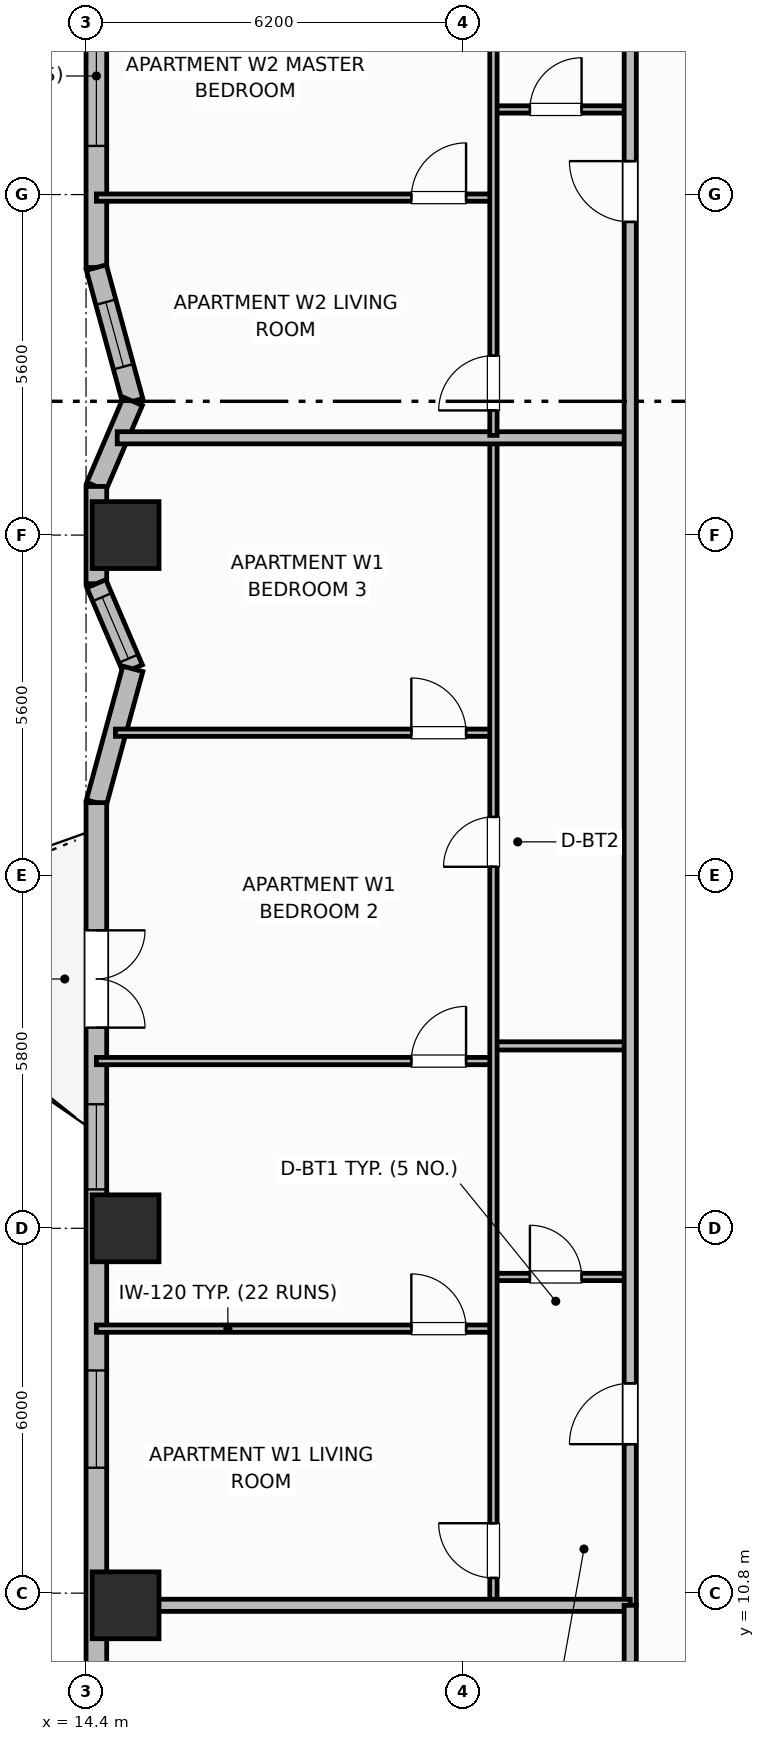
"""IFC4 building model, lengths in metres.
Left out: names, types, materials, properties, quantities, classifications, styles, units other than length and angle.
Written with IfcOpenShell. Run it as: python <this file> out.ifc"""

import sys

from ifc_helpers import new_model, si_unit, direction, frame, frame_2d, origin, origin_2d, place, context, subcontext, project, spatial, rectangle, extrude, element, fill, save


model = new_model("IFC4")
c1 = context("Model", 3, precision=1e-05, world=origin(), true_north=direction((0.0, 1.0)))
c2 = subcontext(c1, "Body", "Model", "MODEL_VIEW")
j1 = project(units=[si_unit("LENGTHUNIT", "METRE"), si_unit("PLANEANGLEUNIT", "RADIAN")], contexts=[c1])
p1 = place(None, origin())
s1 = spatial("IfcSite", under=j1, at=p1, CompositionType="ELEMENT")
p2 = place(p1, origin())
s2 = spatial("IfcBuilding", under=s1, at=p2, CompositionType="ELEMENT")
p3 = place(p2, frame((0.0, 0.0, 88.3)))
s3 = spatial("IfcBuildingStorey", under=s2, at=p3, CompositionType="ELEMENT", Elevation=88.3)
for number, where, z_axis, x_axis in (
    (1, (15.05, 10.6, 0.0), (0.0, 0.0, 1.0), (1.0, 0.0, 0.0)),
    (2, (15.05, 16.8, 0.0), (0.0, 0.0, 1.0), (1.0, 0.0, 0.0)),
    (3, (15.05, 28.2, 0.0), (0.0, 0.0, 1.0), (1.0, 0.0, 0.0)),
):
    element("IfcColumn", number, at=place(p3, frame(where, z_axis=z_axis, x_axis=x_axis)), inside=s3, PredefinedType="COLUMN", context=c2, shape_type="SweptSolid", body=[
        extrude(rectangle(XDim=1.1, YDim=1.1, at=origin_2d()), origin(), (0.0, 0.0, 1.0), 3.7),
    ])
p4 = place(p3, frame((14.57, 47.4, 0.0), z_axis=(0.0, 0.0, 1.0), x_axis=(0.0, -1.0, 0.0)))
e4 = element("IfcWall", 4, at=p4, inside=s3, PredefinedType="SOLIDWALL", context=c2, shape_type="SweptSolid", body=[
    extrude(rectangle(XDim=14.8, YDim=0.34, at=frame_2d((7.4, 0.0))), origin(), (0.0, 0.0, 1.0), 2.7),
])
p5 = place(p4, frame((3.05, 0.0, 0.73)))
e5 = element("IfcOpeningElement", 5, at=p5, cuts=e4, PredefinedType="OPENING", context=c2, shape_type="SweptSolid", body=[
    extrude(rectangle(XDim=1.8, YDim=1.85, at=frame_2d((0.9, 0.925))), frame((0.0, 0.18, 0.0), z_axis=(0.0, -1.0, 0.0), x_axis=(1.0, 0.0, 0.0)), (0.0, 0.0, 1.0), 0.36),
])
p6 = place(p4, frame((6.08, 0.0, 0.89)))
e6 = element("IfcOpeningElement", 6, at=p6, cuts=e4, PredefinedType="OPENING", context=c2, shape_type="SweptSolid", body=[
    extrude(rectangle(XDim=1.1, YDim=1.65, at=frame_2d((0.55, 0.825))), frame((0.0, 0.18, 0.0), z_axis=(0.0, -1.0, 0.0), x_axis=(1.0, 0.0, 0.0)), (0.0, 0.0, 1.0), 0.36),
])
p7 = place(p4, frame((11.0, 0.0, 0.73)))
e7 = element("IfcOpeningElement", 7, at=p7, cuts=e4, PredefinedType="OPENING", context=c2, shape_type="SweptSolid", body=[
    extrude(rectangle(XDim=1.8, YDim=1.85, at=frame_2d((0.9, 0.925))), frame((0.0, 0.18, 0.0), z_axis=(0.0, -1.0, 0.0), x_axis=(1.0, 0.0, 0.0)), (0.0, 0.0, 1.0), 0.36),
])
p8 = place(p3, frame((14.57, 32.6, 0.0), z_axis=(0.0, 0.0, 1.0), x_axis=(0.263035877812, -0.96478605244, 0.0)))
e8 = element("IfcWall", 8, at=p8, inside=s3, PredefinedType="SOLIDWALL", context=c2, shape_type="SweptSolid", body=[
    extrude(rectangle(XDim=2.281, YDim=0.34, at=frame_2d((1.14, 0.0))), origin(), (0.0, 0.0, 1.0), 2.7),
])
p9 = place(p8, frame((0.59, 0.0, 0.89)))
e9 = element("IfcOpeningElement", 9, at=p9, cuts=e8, PredefinedType="OPENING", context=c2, shape_type="SweptSolid", body=[
    extrude(rectangle(XDim=1.1, YDim=1.65, at=frame_2d((0.55, 0.825))), frame((0.0, 0.18, 0.0), z_axis=(0.0, -1.0, 0.0), x_axis=(1.0, 0.0, 0.0)), (0.0, 0.0, 1.0), 0.36),
])
p10 = place(p3, frame((15.17, 30.4, 0.0), z_axis=(0.0, 0.0, 1.0), x_axis=(-0.393861257526, -0.919169902586, 0.0)))
e10 = element("IfcWall", 10, at=p10, inside=s3, PredefinedType="SOLIDWALL", context=c2, shape_type="SweptSolid", body=[
    extrude(rectangle(XDim=1.523, YDim=0.34, at=frame_2d((0.761, 0.0))), origin(), (0.0, 0.0, 1.0), 2.7),
])
p11 = place(p3, frame((14.57, 29.0, 0.0), z_axis=(0.0, 0.0, 1.0), x_axis=(0.0, -1.0, 0.0)))
e11 = element("IfcWall", 11, at=p11, inside=s3, PredefinedType="SOLIDWALL", context=c2, shape_type="SweptSolid", body=[
    extrude(rectangle(XDim=1.6, YDim=0.34, at=frame_2d((0.8, 0.0))), origin(), (0.0, 0.0, 1.0), 2.7),
])
p12 = place(p3, frame((14.57, 27.4, 0.0), z_axis=(0.0, 0.0, 1.0), x_axis=(0.393861257526, -0.919169902586, 0.0)))
e12 = element("IfcWall", 12, at=p12, inside=s3, PredefinedType="SOLIDWALL", context=c2, shape_type="SweptSolid", body=[
    extrude(rectangle(XDim=1.523, YDim=0.34, at=frame_2d((0.761, 0.0))), origin(), (0.0, 0.0, 1.0), 2.7),
])
p13 = place(p12, frame((0.24, 0.0, 0.89)))
e13 = element("IfcOpeningElement", 13, at=p13, cuts=e12, PredefinedType="OPENING", context=c2, shape_type="SweptSolid", body=[
    extrude(rectangle(XDim=1.1, YDim=1.65, at=frame_2d((0.55, 0.825))), frame((0.0, 0.18, 0.0), z_axis=(0.0, -1.0, 0.0), x_axis=(1.0, 0.0, 0.0)), (0.0, 0.0, 1.0), 0.36),
])
p14 = place(p3, frame((15.17, 26.0, 0.0), z_axis=(0.0, 0.0, 1.0), x_axis=(-0.2630630484, -0.964778644336, 0.0)))
e14 = element("IfcWall", 14, at=p14, inside=s3, PredefinedType="SOLIDWALL", context=c2, shape_type="SweptSolid", body=[
    extrude(rectangle(XDim=2.28, YDim=0.34, at=frame_2d((1.14, 0.0))), origin(), (0.0, 0.0, 1.0), 2.7),
])
p15 = place(p3, frame((14.57, 23.8, 0.0), z_axis=(0.0, 0.0, 1.0), x_axis=(0.0, -1.0, 0.0)))
e15 = element("IfcWall", 15, at=p15, inside=s3, PredefinedType="SOLIDWALL", context=c2, shape_type="SweptSolid", body=[
    extrude(rectangle(XDim=14.8, YDim=0.34, at=frame_2d((7.4, 0.0))), origin(), (0.0, 0.0, 1.0), 2.7),
])
p16 = place(p15, frame((2.1, 0.0, 0.0)))
e16 = element("IfcOpeningElement", 16, at=p16, cuts=e15, PredefinedType="OPENING", context=c2, shape_type="SweptSolid", body=[
    extrude(rectangle(XDim=1.6, YDim=2.1, at=frame_2d((0.8, 1.05))), frame((0.0, 0.18, 0.0), z_axis=(0.0, -1.0, 0.0), x_axis=(1.0, 0.0, 0.0)), (0.0, 0.0, 1.0), 0.36),
])
p17 = place(p15, frame((4.96, 0.0, 0.69)))
e17 = element("IfcOpeningElement", 17, at=p17, cuts=e15, PredefinedType="OPENING", context=c2, shape_type="SweptSolid", body=[
    extrude(rectangle(XDim=1.4, YDim=1.85, at=frame_2d((0.7, 0.925))), frame((0.0, 0.18, 0.0), z_axis=(0.0, -1.0, 0.0), x_axis=(1.0, 0.0, 0.0)), (0.0, 0.0, 1.0), 0.36),
])
p18 = place(p15, frame((9.337, 0.0, 0.68)))
e18 = element("IfcOpeningElement", 18, at=p18, cuts=e15, PredefinedType="OPENING", context=c2, shape_type="SweptSolid", body=[
    extrude(rectangle(XDim=1.6, YDim=1.9, at=frame_2d((0.8, 0.95))), frame((0.0, 0.18, 0.0), z_axis=(0.0, -1.0, 0.0), x_axis=(1.0, 0.0, 0.0)), (0.0, 0.0, 1.0), 0.36),
])
p19 = place(p3, frame((21.1, 16.0, 0.0), z_axis=(0.0, 0.0, 1.0), x_axis=(1.0, 0.0, 0.0)))
e19 = element("IfcWall", 19, at=p19, inside=s3, PredefinedType="PARTITIONING", context=c2, shape_type="SweptSolid", body=[
    extrude(rectangle(XDim=2.25, YDim=0.12, at=frame_2d((1.125, 0.0))), origin(), (0.0, 0.0, 1.0), 2.53),
])
p20 = place(p19, frame((0.6, 0.0, 0.0)))
e20 = element("IfcOpeningElement", 20, at=p20, cuts=e19, PredefinedType="OPENING", context=c2, shape_type="SweptSolid", body=[
    extrude(rectangle(XDim=0.85, YDim=2.1, at=frame_2d((0.425, 1.05))), frame((0.0, 0.07, 0.0), z_axis=(0.0, -1.0, 0.0), x_axis=(1.0, 0.0, 0.0)), (0.0, 0.0, 1.0), 0.14),
])
p21 = place(p3, frame((21.1, 19.8, 0.0), z_axis=(0.0, 0.0, 1.0), x_axis=(1.0, 0.0, 0.0)))
e21 = element("IfcWall", 21, at=p21, inside=s3, PredefinedType="PARTITIONING", context=c2, shape_type="SweptSolid", body=[
    extrude(rectangle(XDim=2.25, YDim=0.135, at=frame_2d((1.125, 0.0))), origin(), (0.0, 0.0, 1.0), 2.53),
])
p22 = place(p3, frame((14.57, 15.15, 0.0), z_axis=(0.0, 0.0, 1.0), x_axis=(1.0, 0.0, 0.0)))
e22 = element("IfcWall", 22, at=p22, inside=s3, PredefinedType="PARTITIONING", context=c2, shape_type="SweptSolid", body=[
    extrude(rectangle(XDim=6.53, YDim=0.12, at=frame_2d((3.265, 0.0))), origin(), (0.0, 0.0, 1.0), 2.53),
])
p23 = place(p22, frame((5.18, 0.0, 0.0)))
e23 = element("IfcOpeningElement", 23, at=p23, cuts=e22, PredefinedType="OPENING", context=c2, shape_type="SweptSolid", body=[
    extrude(rectangle(XDim=0.9, YDim=2.1, at=frame_2d((0.45, 1.05))), frame((0.0, 0.07, 0.0), z_axis=(0.0, -1.0, 0.0), x_axis=(1.0, 0.0, 0.0)), (0.0, 0.0, 1.0), 0.14),
])
p24 = place(p3, frame((14.57, 19.55, 0.0), z_axis=(0.0, 0.0, 1.0), x_axis=(1.0, 0.0, 0.0)))
e24 = element("IfcWall", 24, at=p24, inside=s3, PredefinedType="PARTITIONING", context=c2, shape_type="SweptSolid", body=[
    extrude(rectangle(XDim=6.53, YDim=0.12, at=frame_2d((3.265, 0.0))), origin(), (0.0, 0.0, 1.0), 2.53),
])
p25 = place(p24, frame((5.18, 0.0, 0.0)))
e25 = element("IfcOpeningElement", 25, at=p25, cuts=e24, PredefinedType="OPENING", context=c2, shape_type="SweptSolid", body=[
    extrude(rectangle(XDim=0.9, YDim=2.1, at=frame_2d((0.45, 1.05))), frame((0.0, 0.07, 0.0), z_axis=(0.0, -1.0, 0.0), x_axis=(1.0, 0.0, 0.0)), (0.0, 0.0, 1.0), 0.14),
])
p26 = place(p3, frame((14.884, 24.95, 0.0), z_axis=(0.0, 0.0, 1.0), x_axis=(1.0, 0.0, 0.0)))
e26 = element("IfcWall", 26, at=p26, inside=s3, PredefinedType="PARTITIONING", context=c2, shape_type="SweptSolid", body=[
    extrude(rectangle(XDim=6.217, YDim=0.12, at=frame_2d((3.108, 0.0))), origin(), (0.0, 0.0, 1.0), 2.53),
])
p27 = place(p26, frame((4.866, 0.0, 0.0)))
e27 = element("IfcOpeningElement", 27, at=p27, cuts=e26, PredefinedType="OPENING", context=c2, shape_type="SweptSolid", body=[
    extrude(rectangle(XDim=0.9, YDim=2.1, at=frame_2d((0.45, 1.05))), frame((0.0, 0.07, 0.0), z_axis=(0.0, -1.0, 0.0), x_axis=(1.0, 0.0, 0.0)), (0.0, 0.0, 1.0), 0.14),
])
p28 = place(p3, frame((21.1, 10.64, 0.0), z_axis=(0.0, 0.0, 1.0), x_axis=(0.0, 1.0, 0.0)))
e28 = element("IfcWall", 28, at=p28, inside=s3, PredefinedType="PARTITIONING", context=c2, shape_type="SweptSolid", body=[
    extrude(rectangle(XDim=19.12, YDim=0.12, at=frame_2d((9.56, 0.0))), origin(), (0.0, 0.0, 1.0), 2.53),
])
p29 = place(p28, frame((0.41, 0.0, 0.0)))
e29 = element("IfcOpeningElement", 29, at=p29, cuts=e28, PredefinedType="OPENING", context=c2, shape_type="SweptSolid", body=[
    extrude(rectangle(XDim=0.9, YDim=2.1, at=frame_2d((0.45, 1.05))), frame((0.0, 0.07, 0.0), z_axis=(0.0, -1.0, 0.0), x_axis=(1.0, 0.0, 0.0)), (0.0, 0.0, 1.0), 0.14),
])
p30 = place(p28, frame((12.105, 0.0, 0.0)))
e30 = element("IfcOpeningElement", 30, at=p30, cuts=e28, PredefinedType="OPENING", context=c2, shape_type="SweptSolid", body=[
    extrude(rectangle(XDim=0.82, YDim=2.08, at=frame_2d((0.41, 1.04))), frame((0.0, 0.07, 0.0), z_axis=(0.0, -1.0, 0.0), x_axis=(1.0, 0.0, 0.0)), (0.0, 0.0, 1.0), 0.14),
])
p31 = place(p3, frame((14.913, 29.8, 0.0), z_axis=(0.0, 0.0, 1.0), x_axis=(1.0, 0.0, 0.0)))
e31 = element("IfcWall", 31, at=p31, inside=s3, PredefinedType="PARTITIONING", context=c2, shape_type="SweptSolid", body=[
    extrude(rectangle(XDim=8.437, YDim=0.2, at=frame_2d((4.219, 0.0))), origin(), (0.0, 0.0, 1.0), 2.53),
])
p32 = place(p3, frame((21.1, 35.2, 0.0), z_axis=(0.0, 0.0, 1.0), x_axis=(1.0, 0.0, 0.0)))
e32 = element("IfcWall", 32, at=p32, inside=s3, PredefinedType="PARTITIONING", context=c2, shape_type="SweptSolid", body=[
    extrude(rectangle(XDim=2.25, YDim=0.12, at=frame_2d((1.125, 0.0))), origin(), (0.0, 0.0, 1.0), 2.53),
])
p33 = place(p32, frame((0.6, 0.0, 0.0)))
e33 = element("IfcOpeningElement", 33, at=p33, cuts=e32, PredefinedType="OPENING", context=c2, shape_type="SweptSolid", body=[
    extrude(rectangle(XDim=0.85, YDim=2.1, at=frame_2d((0.425, 1.05))), frame((0.0, 0.07, 0.0), z_axis=(0.0, -1.0, 0.0), x_axis=(1.0, 0.0, 0.0)), (0.0, 0.0, 1.0), 0.14),
])
p34 = place(p3, frame((14.57, 33.75, 0.0), z_axis=(0.0, 0.0, 1.0), x_axis=(1.0, 0.0, 0.0)))
e34 = element("IfcWall", 34, at=p34, inside=s3, PredefinedType="PARTITIONING", context=c2, shape_type="SweptSolid", body=[
    extrude(rectangle(XDim=6.53, YDim=0.12, at=frame_2d((3.265, 0.0))), origin(), (0.0, 0.0, 1.0), 2.53),
])
p35 = place(p34, frame((5.18, 0.0, 0.0)))
e35 = element("IfcOpeningElement", 35, at=p35, cuts=e34, PredefinedType="OPENING", context=c2, shape_type="SweptSolid", body=[
    extrude(rectangle(XDim=0.9, YDim=2.1, at=frame_2d((0.45, 1.05))), frame((0.0, 0.07, 0.0), z_axis=(0.0, -1.0, 0.0), x_axis=(1.0, 0.0, 0.0)), (0.0, 0.0, 1.0), 0.14),
])
p36 = place(p3, frame((21.1, 29.84, 0.0), z_axis=(0.0, 0.0, 1.0), x_axis=(0.0, 1.0, 0.0)))
e36 = element("IfcWall", 36, at=p36, inside=s3, PredefinedType="PARTITIONING", context=c2, shape_type="SweptSolid", body=[
    extrude(rectangle(XDim=15.92, YDim=0.12, at=frame_2d((7.96, 0.0))), origin(), (0.0, 0.0, 1.0), 2.53),
])
p37 = place(p36, frame((0.41, 0.0, 0.0)))
e37 = element("IfcOpeningElement", 37, at=p37, cuts=e36, PredefinedType="OPENING", context=c2, shape_type="SweptSolid", body=[
    extrude(rectangle(XDim=0.9, YDim=2.1, at=frame_2d((0.45, 1.05))), frame((0.0, 0.07, 0.0), z_axis=(0.0, -1.0, 0.0), x_axis=(1.0, 0.0, 0.0)), (0.0, 0.0, 1.0), 0.14),
])
p38 = place(p36, frame((13.125, 0.0, 0.0)))
e38 = element("IfcOpeningElement", 38, at=p38, cuts=e36, PredefinedType="OPENING", context=c2, shape_type="SweptSolid", body=[
    extrude(rectangle(XDim=0.82, YDim=2.08, at=frame_2d((0.41, 1.04))), frame((0.0, 0.07, 0.0), z_axis=(0.0, -1.0, 0.0), x_axis=(1.0, 0.0, 0.0)), (0.0, 0.0, 1.0), 0.14),
])
p39 = place(p3, frame((23.35, 10.6, 0.0), z_axis=(0.0, 0.0, 1.0), x_axis=(0.0, 1.0, 0.0)))
e39 = element("IfcWall", 39, at=p39, inside=s3, PredefinedType="PARTITIONING", context=c2, shape_type="SweptSolid", body=[
    extrude(rectangle(XDim=35.2, YDim=0.2, at=frame_2d((17.6, 0.0))), origin(), (0.0, 0.0, 1.0), 2.53),
])
p40 = place(p39, frame((2.65, 0.0, 0.0)))
e40 = element("IfcOpeningElement", 40, at=p40, cuts=e39, PredefinedType="OPENING", context=c2, shape_type="SweptSolid", body=[
    extrude(rectangle(XDim=1.0, YDim=2.15, at=frame_2d((0.5, 1.075))), frame((0.0, 0.11, 0.0), z_axis=(0.0, -1.0, 0.0), x_axis=(1.0, 0.0, 0.0)), (0.0, 0.0, 1.0), 0.22),
])
p41 = place(p39, frame((22.75, 0.0, 0.0)))
e41 = element("IfcOpeningElement", 41, at=p41, cuts=e39, PredefinedType="OPENING", context=c2, shape_type="SweptSolid", body=[
    extrude(rectangle(XDim=1.0, YDim=2.15, at=frame_2d((0.5, 1.075))), frame((0.0, 0.11, 0.0), z_axis=(0.0, -1.0, 0.0), x_axis=(1.0, 0.0, 0.0)), (0.0, 0.0, 1.0), 0.22),
])
p42 = place(p3, frame((14.99, 10.6, 0.0), z_axis=(0.0, 0.0, 1.0), x_axis=(1.0, 0.0, 0.0)))
e42 = element("IfcWall", 42, at=p42, inside=s3, PredefinedType="PARTITIONING", context=c2, shape_type="SweptSolid", body=[
    extrude(rectangle(XDim=8.36, YDim=0.2, at=frame_2d((4.18, 0.0))), origin(), (0.0, 0.0, 1.0), 2.53),
])
p43 = place(p3, frame((23.35, 4.97, 0.0), z_axis=(0.0, 0.0, 1.0), x_axis=(0.0, 1.0, 0.0)))
e43 = element("IfcWall", 43, at=p43, inside=s3, PredefinedType="PARTITIONING", context=c2, shape_type="SweptSolid", body=[
    extrude(rectangle(XDim=5.63, YDim=0.2, at=frame_2d((2.815, 0.0))), origin(), (0.0, 0.0, 1.0), 2.53),
])
p44 = place(p7, origin())
e44 = element("IfcWindow", 44, at=p44, inside=s3, PartitioningType="SINGLE_PANEL", PredefinedType="WINDOW", context=c2, shape_type="SweptSolid", body=[
    extrude(rectangle(XDim=1.8, YDim=1.85, at=frame_2d((0.9, 0.925))), frame((0.0, 0.03, 0.0), z_axis=(0.0, -1.0, 0.0), x_axis=(1.0, 0.0, 0.0)), (0.0, 0.0, 1.0), 0.06),
])
fill(e7, e44)
p45 = place(p9, origin())
e45 = element("IfcWindow", 45, at=p45, inside=s3, PartitioningType="SINGLE_PANEL", PredefinedType="WINDOW", context=c2, shape_type="SweptSolid", body=[
    extrude(rectangle(XDim=1.1, YDim=1.65, at=frame_2d((0.55, 0.825))), frame((0.0, 0.03, 0.0), z_axis=(0.0, -1.0, 0.0), x_axis=(1.0, 0.0, 0.0)), (0.0, 0.0, 1.0), 0.06),
])
fill(e9, e45)
p46 = place(p13, origin())
e46 = element("IfcWindow", 46, at=p46, inside=s3, PartitioningType="SINGLE_PANEL", PredefinedType="WINDOW", context=c2, shape_type="SweptSolid", body=[
    extrude(rectangle(XDim=1.1, YDim=1.65, at=frame_2d((0.55, 0.825))), frame((0.0, 0.03, 0.0), z_axis=(0.0, -1.0, 0.0), x_axis=(1.0, 0.0, 0.0)), (0.0, 0.0, 1.0), 0.06),
])
fill(e13, e46)
p47 = place(p16, origin())
e47 = element("IfcDoor", 47, at=p47, inside=s3, OperationType="DOUBLE_DOOR_SINGLE_SWING", PredefinedType="DOOR", context=c2, shape_type="SweptSolid", body=[
    extrude(rectangle(XDim=1.6, YDim=2.1, at=frame_2d((0.8, 1.05))), frame((0.0, 0.025, 0.0), z_axis=(0.0, -1.0, 0.0), x_axis=(1.0, 0.0, 0.0)), (0.0, 0.0, 1.0), 0.05),
])
fill(e16, e47)
p48 = place(p17, origin())
e48 = element("IfcWindow", 48, at=p48, inside=s3, PartitioningType="SINGLE_PANEL", PredefinedType="WINDOW", context=c2, shape_type="SweptSolid", body=[
    extrude(rectangle(XDim=1.4, YDim=1.85, at=frame_2d((0.7, 0.925))), frame((0.0, 0.03, 0.0), z_axis=(0.0, -1.0, 0.0), x_axis=(1.0, 0.0, 0.0)), (0.0, 0.0, 1.0), 0.06),
])
fill(e17, e48)
p49 = place(p18, origin())
e49 = element("IfcWindow", 49, at=p49, inside=s3, PartitioningType="SINGLE_PANEL", PredefinedType="WINDOW", context=c2, shape_type="SweptSolid", body=[
    extrude(rectangle(XDim=1.6, YDim=1.9, at=frame_2d((0.8, 0.95))), frame((0.0, 0.03, 0.0), z_axis=(0.0, -1.0, 0.0), x_axis=(1.0, 0.0, 0.0)), (0.0, 0.0, 1.0), 0.06),
])
fill(e18, e49)
p50 = place(p20, origin())
e50 = element("IfcDoor", 50, at=p50, inside=s3, OperationType="SINGLE_SWING_LEFT", PredefinedType="DOOR", context=c2, shape_type="SweptSolid", body=[
    extrude(rectangle(XDim=0.85, YDim=2.1, at=frame_2d((0.425, 1.05))), frame((0.0, 0.025, 0.0), z_axis=(0.0, -1.0, 0.0), x_axis=(1.0, 0.0, 0.0)), (0.0, 0.0, 1.0), 0.05),
])
fill(e20, e50)
p51 = place(p23, origin())
e51 = element("IfcDoor", 51, at=p51, inside=s3, OperationType="SINGLE_SWING_LEFT", PredefinedType="DOOR", context=c2, shape_type="SweptSolid", body=[
    extrude(rectangle(XDim=0.9, YDim=2.1, at=frame_2d((0.45, 1.05))), frame((0.0, 0.025, 0.0), z_axis=(0.0, -1.0, 0.0), x_axis=(1.0, 0.0, 0.0)), (0.0, 0.0, 1.0), 0.05),
])
fill(e23, e51)
p52 = place(p25, origin())
e52 = element("IfcDoor", 52, at=p52, inside=s3, OperationType="SINGLE_SWING_RIGHT", PredefinedType="DOOR", context=c2, shape_type="SweptSolid", body=[
    extrude(rectangle(XDim=0.9, YDim=2.1, at=frame_2d((0.45, 1.05))), frame((0.0, 0.025, 0.0), z_axis=(0.0, -1.0, 0.0), x_axis=(1.0, 0.0, 0.0)), (0.0, 0.0, 1.0), 0.05),
])
fill(e25, e52)
p53 = place(p27, origin())
e53 = element("IfcDoor", 53, at=p53, inside=s3, OperationType="SINGLE_SWING_LEFT", PredefinedType="DOOR", context=c2, shape_type="SweptSolid", body=[
    extrude(rectangle(XDim=0.9, YDim=2.1, at=frame_2d((0.45, 1.05))), frame((0.0, 0.025, 0.0), z_axis=(0.0, -1.0, 0.0), x_axis=(1.0, 0.0, 0.0)), (0.0, 0.0, 1.0), 0.05),
])
fill(e27, e53)
p54 = place(p29, origin())
e54 = element("IfcDoor", 54, at=p54, inside=s3, OperationType="SINGLE_SWING_RIGHT", PredefinedType="DOOR", context=c2, shape_type="SweptSolid", body=[
    extrude(rectangle(XDim=0.9, YDim=2.1, at=frame_2d((0.45, 1.05))), frame((0.0, 0.025, 0.0), z_axis=(0.0, -1.0, 0.0), x_axis=(1.0, 0.0, 0.0)), (0.0, 0.0, 1.0), 0.05),
])
fill(e29, e54)
p55 = place(p30, origin())
e55 = element("IfcDoor", 55, at=p55, inside=s3, OperationType="SINGLE_SWING_LEFT", PredefinedType="DOOR", context=c2, shape_type="SweptSolid", body=[
    extrude(rectangle(XDim=0.82, YDim=2.08, at=frame_2d((0.41, 1.04))), frame((0.0, 0.025, 0.0), z_axis=(0.0, -1.0, 0.0), x_axis=(1.0, 0.0, 0.0)), (0.0, 0.0, 1.0), 0.05),
])
fill(e30, e55)
p56 = place(p33, origin())
e56 = element("IfcDoor", 56, at=p56, inside=s3, OperationType="SINGLE_SWING_RIGHT", PredefinedType="DOOR", context=c2, shape_type="SweptSolid", body=[
    extrude(rectangle(XDim=0.85, YDim=2.1, at=frame_2d((0.425, 1.05))), frame((0.0, 0.025, 0.0), z_axis=(0.0, -1.0, 0.0), x_axis=(1.0, 0.0, 0.0)), (0.0, 0.0, 1.0), 0.05),
])
fill(e33, e56)
p57 = place(p35, origin())
e57 = element("IfcDoor", 57, at=p57, inside=s3, OperationType="SINGLE_SWING_RIGHT", PredefinedType="DOOR", context=c2, shape_type="SweptSolid", body=[
    extrude(rectangle(XDim=0.9, YDim=2.1, at=frame_2d((0.45, 1.05))), frame((0.0, 0.025, 0.0), z_axis=(0.0, -1.0, 0.0), x_axis=(1.0, 0.0, 0.0)), (0.0, 0.0, 1.0), 0.05),
])
fill(e35, e57)
p58 = place(p37, origin())
e58 = element("IfcDoor", 58, at=p58, inside=s3, OperationType="SINGLE_SWING_LEFT", PredefinedType="DOOR", context=c2, shape_type="SweptSolid", body=[
    extrude(rectangle(XDim=0.9, YDim=2.1, at=frame_2d((0.45, 1.05))), frame((0.0, 0.025, 0.0), z_axis=(0.0, -1.0, 0.0), x_axis=(1.0, 0.0, 0.0)), (0.0, 0.0, 1.0), 0.05),
])
fill(e37, e58)
p59 = place(p40, origin())
e59 = element("IfcDoor", 59, at=p59, inside=s3, OperationType="SINGLE_SWING_LEFT", PredefinedType="DOOR", context=c2, shape_type="SweptSolid", body=[
    extrude(rectangle(XDim=1.0, YDim=2.15, at=frame_2d((0.5, 1.075))), frame((0.0, 0.025, 0.0), z_axis=(0.0, -1.0, 0.0), x_axis=(1.0, 0.0, 0.0)), (0.0, 0.0, 1.0), 0.05),
])
fill(e40, e59)
p60 = place(p41, origin())
e60 = element("IfcDoor", 60, at=p60, inside=s3, OperationType="SINGLE_SWING_RIGHT", PredefinedType="DOOR", context=c2, shape_type="SweptSolid", body=[
    extrude(rectangle(XDim=1.0, YDim=2.15, at=frame_2d((0.5, 1.075))), frame((0.0, 0.025, 0.0), z_axis=(0.0, -1.0, 0.0), x_axis=(1.0, 0.0, 0.0)), (0.0, 0.0, 1.0), 0.05),
])
fill(e41, e60)
save(model, sys.argv[1])
